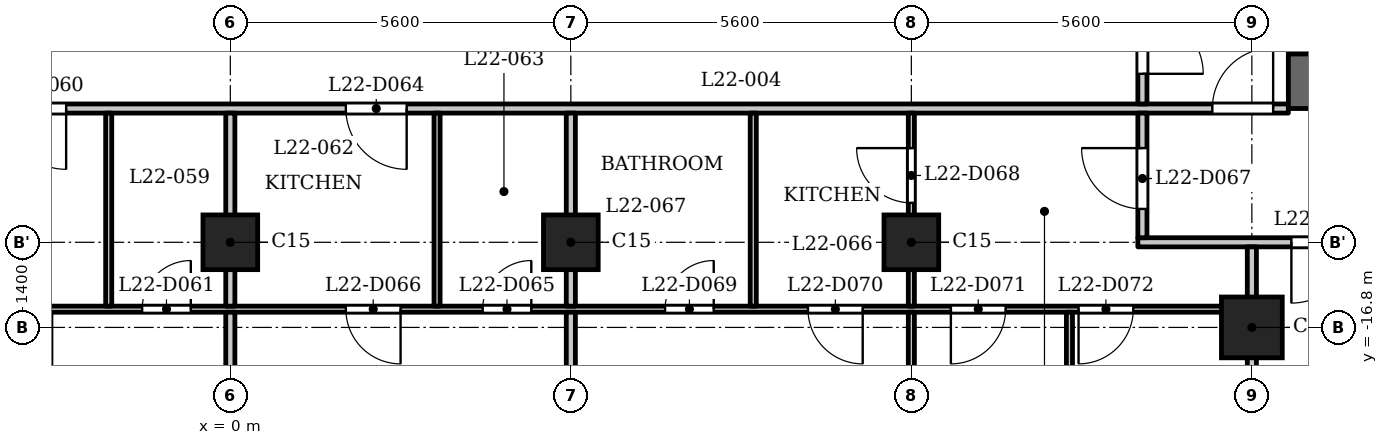
"""IFC4 building model, lengths in metres.
Left out: names, types, materials, properties, quantities, classifications, styles, units other than length and angle.
Written with IfcOpenShell. Run it as: python <this file> out.ifc"""

import sys

from ifc_helpers import new_model, si_unit, direction, frame, frame_2d, origin, origin_2d, place, context, subcontext, project, spatial, rectangle, extrude, element, fill, save


model = new_model("IFC4")
c1 = context("Model", 3, precision=1e-05, world=origin(), true_north=direction((0.0, 1.0)))
c2 = subcontext(c1, "Body", "Model", "MODEL_VIEW")
j1 = project(units=[si_unit("LENGTHUNIT", "METRE"), si_unit("PLANEANGLEUNIT", "RADIAN")], contexts=[c1])
p1 = place(None, origin())
s1 = spatial("IfcSite", under=j1, at=p1, CompositionType="ELEMENT")
p2 = place(p1, origin())
s2 = spatial("IfcBuilding", under=s1, at=p2, CompositionType="ELEMENT")
p3 = place(p2, frame((0.0, 0.0, 90.3)))
s3 = spatial("IfcBuildingStorey", under=s2, at=p3, CompositionType="ELEMENT", Elevation=90.3)
p4 = place(p3, frame((16.8, -16.8, 0.0), z_axis=(0.0, 0.0, 1.0), x_axis=(1.0, 0.0, 0.0)))
e1 = element("IfcColumn", 1, at=p4, inside=s3, PredefinedType="COLUMN", context=c2, shape_type="SweptSolid", body=[
    extrude(rectangle(XDim=1.0, YDim=1.0, at=origin_2d()), origin(), (0.0, 0.0, 1.0), 3.5),
])
for number, where, z_axis, x_axis in (
    (2, (0.0, -15.4, 0.0), (0.0, 0.0, 1.0), (1.0, 0.0, 0.0)),
    (3, (5.6, -15.4, 0.0), (0.0, 0.0, 1.0), (1.0, 0.0, 0.0)),
    (4, (11.2, -15.4, 0.0), (0.0, 0.0, 1.0), (1.0, 0.0, 0.0)),
):
    element("IfcColumn", number, at=place(p3, frame(where, z_axis=z_axis, x_axis=x_axis)), inside=s3, PredefinedType="COLUMN", context=c2, shape_type="SweptSolid", body=[
        extrude(rectangle(XDim=0.9, YDim=0.9, at=origin_2d()), origin(), (0.0, 0.0, 1.0), 3.5),
    ])
p5 = place(p3, frame((17.4, -12.75, 0.0), z_axis=(0.0, 0.0, 1.0), x_axis=(1.0, 0.0, 0.0)))
e5 = element("IfcWall", 5, at=p5, inside=s3, PredefinedType="SHEAR", context=c2, shape_type="SweptSolid", body=[
    extrude(rectangle(XDim=10.4, YDim=0.9, at=frame_2d((5.2, 0.0))), origin(), (0.0, 0.0, 1.0), 3.2),
])
p6 = place(p3, frame((17.6, -12.3, 0.0), z_axis=(0.0, 0.0, 1.0), x_axis=(0.0, 1.0, 0.0)))
e6 = element("IfcWall", 6, at=p6, inside=s3, PredefinedType="SHEAR", context=c2, shape_type="SweptSolid", body=[
    extrude(rectangle(XDim=24.6, YDim=0.4, at=frame_2d((12.3, 0.0))), origin(), (0.0, 0.0, 1.0), 3.2),
])
p7 = place(p6, frame((6.0, 0.0, 0.0)))
e7 = element("IfcOpeningElement", 7, at=p7, cuts=e6, PredefinedType="OPENING", context=c2, shape_type="SweptSolid", body=[
    extrude(rectangle(XDim=1.1, YDim=2.1, at=frame_2d((0.55, 1.05))), frame((0.0, 0.21, 0.0), z_axis=(0.0, -1.0, 0.0), x_axis=(1.0, 0.0, 0.0)), (0.0, 0.0, 1.0), 0.42),
])
p8 = place(p6, frame((8.4, 0.0, 0.0)))
e8 = element("IfcOpeningElement", 8, at=p8, cuts=e6, PredefinedType="OPENING", context=c2, shape_type="SweptSolid", body=[
    extrude(rectangle(XDim=1.1, YDim=2.1, at=frame_2d((0.55, 1.05))), frame((0.0, 0.21, 0.0), z_axis=(0.0, -1.0, 0.0), x_axis=(1.0, 0.0, 0.0)), (0.0, 0.0, 1.0), 0.42),
])
p9 = place(p6, frame((10.8, 0.0, 0.0)))
e9 = element("IfcOpeningElement", 9, at=p9, cuts=e6, PredefinedType="OPENING", context=c2, shape_type="SweptSolid", body=[
    extrude(rectangle(XDim=1.1, YDim=2.1, at=frame_2d((0.55, 1.05))), frame((0.0, 0.21, 0.0), z_axis=(0.0, -1.0, 0.0), x_axis=(1.0, 0.0, 0.0)), (0.0, 0.0, 1.0), 0.42),
])
p10 = place(p6, frame((16.75, 0.0, 0.0)))
e10 = element("IfcOpeningElement", 10, at=p10, cuts=e6, PredefinedType="OPENING", context=c2, shape_type="SweptSolid", body=[
    extrude(rectangle(XDim=0.9, YDim=2.1, at=frame_2d((0.45, 1.05))), frame((0.0, 0.21, 0.0), z_axis=(0.0, -1.0, 0.0), x_axis=(1.0, 0.0, 0.0)), (0.0, 0.0, 1.0), 0.42),
])
p11 = place(p6, frame((22.8, 0.0, 0.0)))
e11 = element("IfcOpeningElement", 11, at=p11, cuts=e6, PredefinedType="OPENING", context=c2, shape_type="SweptSolid", body=[
    extrude(rectangle(XDim=1.1, YDim=2.1, at=frame_2d((0.55, 1.05))), frame((0.0, 0.21, 0.0), z_axis=(0.0, -1.0, 0.0), x_axis=(1.0, 0.0, 0.0)), (0.0, 0.0, 1.0), 0.42),
])
p12 = place(p6, frame((0.7, 0.0, 0.0)))
e12 = element("IfcOpeningElement", 12, at=p12, cuts=e6, PredefinedType="OPENING", context=c2, shape_type="SweptSolid", body=[
    extrude(rectangle(XDim=1.1, YDim=2.1, at=frame_2d((0.55, 1.05))), frame((0.0, 0.21, 0.0), z_axis=(0.0, -1.0, 0.0), x_axis=(1.0, 0.0, 0.0)), (0.0, 0.0, 1.0), 0.42),
])
p13 = place(p6, frame((12.775, 0.0, 0.0)))
e13 = element("IfcOpeningElement", 13, at=p13, cuts=e6, PredefinedType="OPENING", context=c2, shape_type="SweptSolid", body=[
    extrude(rectangle(XDim=1.8, YDim=2.1, at=frame_2d((0.9, 1.05))), frame((0.0, 0.21, 0.0), z_axis=(0.0, -1.0, 0.0), x_axis=(1.0, 0.0, 0.0)), (0.0, 0.0, 1.0), 0.42),
])
p14 = place(p3, frame((-16.725, -16.5, 0.0), z_axis=(0.0, 0.0, 1.0), x_axis=(1.0, 0.0, 0.0)))
e14 = element("IfcWall", 14, at=p14, inside=s3, PredefinedType="PARTITIONING", context=c2, shape_type="SweptSolid", body=[
    extrude(rectangle(XDim=33.45, YDim=0.1, at=frame_2d((16.725, 0.0))), origin(), (0.0, 0.0, 1.0), 3.2),
])
p15 = place(p14, frame((3.825, 0.0, 0.0)))
e15 = element("IfcOpeningElement", 15, at=p15, cuts=e14, PredefinedType="OPENING", context=c2, shape_type="SweptSolid", body=[
    extrude(rectangle(XDim=0.8, YDim=2.1, at=frame_2d((0.4, 1.05))), frame((0.0, 0.06, 0.0), z_axis=(0.0, -1.0, 0.0), x_axis=(1.0, 0.0, 0.0)), (0.0, 0.0, 1.0), 0.12),
])
p16 = place(p14, frame((1.825, 0.0, 0.0)))
e16 = element("IfcOpeningElement", 16, at=p16, cuts=e14, PredefinedType="OPENING", context=c2, shape_type="SweptSolid", body=[
    extrude(rectangle(XDim=0.9, YDim=2.1, at=frame_2d((0.45, 1.05))), frame((0.0, 0.06, 0.0), z_axis=(0.0, -1.0, 0.0), x_axis=(1.0, 0.0, 0.0)), (0.0, 0.0, 1.0), 0.12),
])
p17 = place(p14, frame((9.675, 0.0, 0.0)))
e17 = element("IfcOpeningElement", 17, at=p17, cuts=e14, PredefinedType="OPENING", context=c2, shape_type="SweptSolid", body=[
    extrude(rectangle(XDim=0.8, YDim=2.1, at=frame_2d((0.4, 1.05))), frame((0.0, 0.06, 0.0), z_axis=(0.0, -1.0, 0.0), x_axis=(1.0, 0.0, 0.0)), (0.0, 0.0, 1.0), 0.12),
])
p18 = place(p14, frame((6.425, 0.0, 0.0)))
e18 = element("IfcOpeningElement", 18, at=p18, cuts=e14, PredefinedType="OPENING", context=c2, shape_type="SweptSolid", body=[
    extrude(rectangle(XDim=0.9, YDim=2.1, at=frame_2d((0.45, 1.05))), frame((0.0, 0.06, 0.0), z_axis=(0.0, -1.0, 0.0), x_axis=(1.0, 0.0, 0.0)), (0.0, 0.0, 1.0), 0.12),
])
p19 = place(p14, frame((15.275, 0.0, 0.0)))
e19 = element("IfcOpeningElement", 19, at=p19, cuts=e14, PredefinedType="OPENING", context=c2, shape_type="SweptSolid", body=[
    extrude(rectangle(XDim=0.8, YDim=2.1, at=frame_2d((0.4, 1.05))), frame((0.0, 0.06, 0.0), z_axis=(0.0, -1.0, 0.0), x_axis=(1.0, 0.0, 0.0)), (0.0, 0.0, 1.0), 0.12),
])
p20 = place(p14, frame((12.025, 0.0, 0.0)))
e20 = element("IfcOpeningElement", 20, at=p20, cuts=e14, PredefinedType="OPENING", context=c2, shape_type="SweptSolid", body=[
    extrude(rectangle(XDim=0.9, YDim=2.1, at=frame_2d((0.45, 1.05))), frame((0.0, 0.06, 0.0), z_axis=(0.0, -1.0, 0.0), x_axis=(1.0, 0.0, 0.0)), (0.0, 0.0, 1.0), 0.12),
])
p21 = place(p14, frame((20.875, 0.0, 0.0)))
e21 = element("IfcOpeningElement", 21, at=p21, cuts=e14, PredefinedType="OPENING", context=c2, shape_type="SweptSolid", body=[
    extrude(rectangle(XDim=0.8, YDim=2.1, at=frame_2d((0.4, 1.05))), frame((0.0, 0.06, 0.0), z_axis=(0.0, -1.0, 0.0), x_axis=(1.0, 0.0, 0.0)), (0.0, 0.0, 1.0), 0.12),
])
p22 = place(p14, frame((18.625, 0.0, 0.0)))
e22 = element("IfcOpeningElement", 22, at=p22, cuts=e14, PredefinedType="OPENING", context=c2, shape_type="SweptSolid", body=[
    extrude(rectangle(XDim=0.9, YDim=2.1, at=frame_2d((0.45, 1.05))), frame((0.0, 0.06, 0.0), z_axis=(0.0, -1.0, 0.0), x_axis=(1.0, 0.0, 0.0)), (0.0, 0.0, 1.0), 0.12),
])
p23 = place(p14, frame((23.875, 0.0, 0.0)))
e23 = element("IfcOpeningElement", 23, at=p23, cuts=e14, PredefinedType="OPENING", context=c2, shape_type="SweptSolid", body=[
    extrude(rectangle(XDim=0.8, YDim=2.1, at=frame_2d((0.4, 1.05))), frame((0.0, 0.06, 0.0), z_axis=(0.0, -1.0, 0.0), x_axis=(1.0, 0.0, 0.0)), (0.0, 0.0, 1.0), 0.12),
])
p24 = place(p14, frame((26.225, 0.0, 0.0)))
e24 = element("IfcOpeningElement", 24, at=p24, cuts=e14, PredefinedType="OPENING", context=c2, shape_type="SweptSolid", body=[
    extrude(rectangle(XDim=0.9, YDim=2.1, at=frame_2d((0.45, 1.05))), frame((0.0, 0.06, 0.0), z_axis=(0.0, -1.0, 0.0), x_axis=(1.0, 0.0, 0.0)), (0.0, 0.0, 1.0), 0.12),
])
p25 = place(p14, frame((28.575, 0.0, 0.0)))
e25 = element("IfcOpeningElement", 25, at=p25, cuts=e14, PredefinedType="OPENING", context=c2, shape_type="SweptSolid", body=[
    extrude(rectangle(XDim=0.9, YDim=2.1, at=frame_2d((0.45, 1.05))), frame((0.0, 0.06, 0.0), z_axis=(0.0, -1.0, 0.0), x_axis=(1.0, 0.0, 0.0)), (0.0, 0.0, 1.0), 0.12),
])
p26 = place(p14, frame((30.675, 0.0, 0.0)))
e26 = element("IfcOpeningElement", 26, at=p26, cuts=e14, PredefinedType="OPENING", context=c2, shape_type="SweptSolid", body=[
    extrude(rectangle(XDim=0.9, YDim=2.1, at=frame_2d((0.45, 1.05))), frame((0.0, 0.06, 0.0), z_axis=(0.0, -1.0, 0.0), x_axis=(1.0, 0.0, 0.0)), (0.0, 0.0, 1.0), 0.12),
])
p27 = place(p3, frame((14.925, -15.4, 0.0), z_axis=(0.0, 0.0, 1.0), x_axis=(1.0, 0.0, 0.0)))
e27 = element("IfcWall", 27, at=p27, inside=s3, PredefinedType="PARTITIONING", context=c2, shape_type="SweptSolid", body=[
    extrude(rectangle(XDim=12.559, YDim=0.15, at=frame_2d((6.279, 0.0))), origin(), (0.0, 0.0, 1.0), 3.2),
])
p28 = place(p27, frame((2.525, 0.0, 0.0)))
e28 = element("IfcOpeningElement", 28, at=p28, cuts=e27, PredefinedType="OPENING", context=c2, shape_type="SweptSolid", body=[
    extrude(rectangle(XDim=1.0, YDim=2.1, at=frame_2d((0.5, 1.05))), frame((0.0, 0.085, 0.0), z_axis=(0.0, -1.0, 0.0), x_axis=(1.0, 0.0, 0.0)), (0.0, 0.0, 1.0), 0.17),
])
p29 = place(p3, frame((-17.4, -13.2, 0.0), z_axis=(0.0, 0.0, 1.0), x_axis=(1.0, 0.0, 0.0)))
e29 = element("IfcWall", 29, at=p29, inside=s3, PredefinedType="PARTITIONING", context=c2, shape_type="SweptSolid", body=[
    extrude(rectangle(XDim=34.8, YDim=0.15, at=frame_2d((17.4, 0.0))), origin(), (0.0, 0.0, 1.0), 3.2),
])
p30 = place(p29, frame((0.15, 0.0, 0.0)))
e30 = element("IfcOpeningElement", 30, at=p30, cuts=e29, PredefinedType="OPENING", context=c2, shape_type="SweptSolid", body=[
    extrude(rectangle(XDim=1.0, YDim=2.1, at=frame_2d((0.5, 1.05))), frame((0.0, 0.085, 0.0), z_axis=(0.0, -1.0, 0.0), x_axis=(1.0, 0.0, 0.0)), (0.0, 0.0, 1.0), 0.17),
])
p31 = place(p29, frame((33.55, 0.0, 0.0)))
e31 = element("IfcOpeningElement", 31, at=p31, cuts=e29, PredefinedType="OPENING", context=c2, shape_type="SweptSolid", body=[
    extrude(rectangle(XDim=1.0, YDim=2.1, at=frame_2d((0.5, 1.05))), frame((0.0, 0.085, 0.0), z_axis=(0.0, -1.0, 0.0), x_axis=(1.0, 0.0, 0.0)), (0.0, 0.0, 1.0), 0.17),
])
p32 = place(p29, frame((7.35, 0.0, 0.0)))
e32 = element("IfcOpeningElement", 32, at=p32, cuts=e29, PredefinedType="OPENING", context=c2, shape_type="SweptSolid", body=[
    extrude(rectangle(XDim=1.0, YDim=2.1, at=frame_2d((0.5, 1.05))), frame((0.0, 0.085, 0.0), z_axis=(0.0, -1.0, 0.0), x_axis=(1.0, 0.0, 0.0)), (0.0, 0.0, 1.0), 0.17),
])
p33 = place(p29, frame((13.7, 0.0, 0.0)))
e33 = element("IfcOpeningElement", 33, at=p33, cuts=e29, PredefinedType="OPENING", context=c2, shape_type="SweptSolid", body=[
    extrude(rectangle(XDim=1.0, YDim=2.1, at=frame_2d((0.5, 1.05))), frame((0.0, 0.085, 0.0), z_axis=(0.0, -1.0, 0.0), x_axis=(1.0, 0.0, 0.0)), (0.0, 0.0, 1.0), 0.17),
])
p34 = place(p29, frame((19.3, 0.0, 0.0)))
e34 = element("IfcOpeningElement", 34, at=p34, cuts=e29, PredefinedType="OPENING", context=c2, shape_type="SweptSolid", body=[
    extrude(rectangle(XDim=1.0, YDim=2.1, at=frame_2d((0.5, 1.05))), frame((0.0, 0.085, 0.0), z_axis=(0.0, -1.0, 0.0), x_axis=(1.0, 0.0, 0.0)), (0.0, 0.0, 1.0), 0.17),
])
p35 = place(p3, frame((-2.0, -16.45, 0.0), z_axis=(0.0, 0.0, 1.0), x_axis=(0.0, 1.0, 0.0)))
e35 = element("IfcWall", 35, at=p35, inside=s3, PredefinedType="PARTITIONING", context=c2, shape_type="SweptSolid", body=[
    extrude(rectangle(XDim=3.175, YDim=0.1, at=frame_2d((1.587, 0.0))), origin(), (0.0, 0.0, 1.0), 3.2),
])
p36 = place(p3, frame((0.0, -23.03, 0.0), z_axis=(0.0, 0.0, 1.0), x_axis=(0.0, 1.0, 0.0)))
e36 = element("IfcWall", 36, at=p36, inside=s3, PredefinedType="PARTITIONING", context=c2, shape_type="SweptSolid", body=[
    extrude(rectangle(XDim=6.48, YDim=0.15, at=frame_2d((3.24, 0.0))), origin(), (0.0, 0.0, 1.0), 3.2),
])
p37 = place(p3, frame((0.0, -16.45, 0.0), z_axis=(0.0, 0.0, 1.0), x_axis=(0.0, 1.0, 0.0)))
e37 = element("IfcWall", 37, at=p37, inside=s3, PredefinedType="PARTITIONING", context=c2, shape_type="SweptSolid", body=[
    extrude(rectangle(XDim=3.175, YDim=0.15, at=frame_2d((1.587, 0.0))), origin(), (0.0, 0.0, 1.0), 3.2),
])
p38 = place(p3, frame((3.4, -16.45, 0.0), z_axis=(0.0, 0.0, 1.0), x_axis=(0.0, 1.0, 0.0)))
e38 = element("IfcWall", 38, at=p38, inside=s3, PredefinedType="PARTITIONING", context=c2, shape_type="SweptSolid", body=[
    extrude(rectangle(XDim=3.175, YDim=0.1, at=frame_2d((1.587, 0.0))), origin(), (0.0, 0.0, 1.0), 3.2),
])
p39 = place(p3, frame((5.6, -23.03, 0.0), z_axis=(0.0, 0.0, 1.0), x_axis=(0.0, 1.0, 0.0)))
e39 = element("IfcWall", 39, at=p39, inside=s3, PredefinedType="PARTITIONING", context=c2, shape_type="SweptSolid", body=[
    extrude(rectangle(XDim=6.48, YDim=0.15, at=frame_2d((3.24, 0.0))), origin(), (0.0, 0.0, 1.0), 3.2),
])
p40 = place(p3, frame((5.6, -16.45, 0.0), z_axis=(0.0, 0.0, 1.0), x_axis=(0.0, 1.0, 0.0)))
e40 = element("IfcWall", 40, at=p40, inside=s3, PredefinedType="PARTITIONING", context=c2, shape_type="SweptSolid", body=[
    extrude(rectangle(XDim=3.175, YDim=0.15, at=frame_2d((1.587, 0.0))), origin(), (0.0, 0.0, 1.0), 3.2),
])
p41 = place(p3, frame((8.6, -16.45, 0.0), z_axis=(0.0, 0.0, 1.0), x_axis=(0.0, 1.0, 0.0)))
e41 = element("IfcWall", 41, at=p41, inside=s3, PredefinedType="PARTITIONING", context=c2, shape_type="SweptSolid", body=[
    extrude(rectangle(XDim=3.175, YDim=0.1, at=frame_2d((1.587, 0.0))), origin(), (0.0, 0.0, 1.0), 3.2),
])
p42 = place(p3, frame((11.2, -23.03, 0.0), z_axis=(0.0, 0.0, 1.0), x_axis=(0.0, 1.0, 0.0)))
e42 = element("IfcWall", 42, at=p42, inside=s3, PredefinedType="PARTITIONING", context=c2, shape_type="SweptSolid", body=[
    extrude(rectangle(XDim=6.48, YDim=0.1, at=frame_2d((3.24, 0.0))), origin(), (0.0, 0.0, 1.0), 3.2),
])
p43 = place(p3, frame((11.2, -16.45, 0.0), z_axis=(0.0, 0.0, 1.0), x_axis=(0.0, 1.0, 0.0)))
e43 = element("IfcWall", 43, at=p43, inside=s3, PredefinedType="PARTITIONING", context=c2, shape_type="SweptSolid", body=[
    extrude(rectangle(XDim=3.175, YDim=0.1, at=frame_2d((1.587, 0.0))), origin(), (0.0, 0.0, 1.0), 3.2),
])
p44 = place(p43, frame((1.699, 0.0, 0.0)))
e44 = element("IfcOpeningElement", 44, at=p44, cuts=e43, PredefinedType="OPENING", context=c2, shape_type="SweptSolid", body=[
    extrude(rectangle(XDim=0.9, YDim=2.1, at=frame_2d((0.45, 1.05))), frame((0.0, 0.06, 0.0), z_axis=(0.0, -1.0, 0.0), x_axis=(1.0, 0.0, 0.0)), (0.0, 0.0, 1.0), 0.12),
])
p45 = place(p3, frame((13.8, -22.08, 0.0), z_axis=(0.0, 0.0, 1.0), x_axis=(0.0, 1.0, 0.0)))
e45 = element("IfcWall", 45, at=p45, inside=s3, PredefinedType="PARTITIONING", context=c2, shape_type="SweptSolid", body=[
    extrude(rectangle(XDim=5.53, YDim=0.1, at=frame_2d((2.765, 0.0))), origin(), (0.0, 0.0, 1.0), 3.2),
])
p46 = place(p3, frame((15.0, -15.325, 0.0), z_axis=(0.0, 0.0, 1.0), x_axis=(0.0, 1.0, 0.0)))
e46 = element("IfcWall", 46, at=p46, inside=s3, PredefinedType="PARTITIONING", context=c2, shape_type="SweptSolid", body=[
    extrude(rectangle(XDim=2.05, YDim=0.15, at=frame_2d((1.025, 0.0))), origin(), (0.0, 0.0, 1.0), 3.2),
])
p47 = place(p46, frame((0.474, 0.0, 0.0)))
e47 = element("IfcOpeningElement", 47, at=p47, cuts=e46, PredefinedType="OPENING", context=c2, shape_type="SweptSolid", body=[
    extrude(rectangle(XDim=1.0, YDim=2.1, at=frame_2d((0.5, 1.05))), frame((0.0, 0.085, 0.0), z_axis=(0.0, -1.0, 0.0), x_axis=(1.0, 0.0, 0.0)), (0.0, 0.0, 1.0), 0.17),
])
p48 = place(p3, frame((15.0, -13.125, 0.0), z_axis=(0.0, 0.0, 1.0), x_axis=(0.0, 1.0, 0.0)))
e48 = element("IfcWall", 48, at=p48, inside=s3, PredefinedType="PARTITIONING", context=c2, shape_type="SweptSolid", body=[
    extrude(rectangle(XDim=6.356, YDim=0.15, at=frame_2d((3.178, 0.0))), origin(), (0.0, 0.0, 1.0), 3.2),
])
p49 = place(p48, frame((0.496, 0.0, 0.0)))
e49 = element("IfcOpeningElement", 49, at=p49, cuts=e48, PredefinedType="OPENING", context=c2, shape_type="SweptSolid", body=[
    extrude(rectangle(XDim=1.0, YDim=2.1, at=frame_2d((0.5, 1.05))), frame((0.0, 0.085, 0.0), z_axis=(0.0, -1.0, 0.0), x_axis=(1.0, 0.0, 0.0)), (0.0, 0.0, 1.0), 0.17),
])
p50 = place(p3, frame((16.8, -23.03, 0.0), z_axis=(0.0, 0.0, 1.0), x_axis=(0.0, 1.0, 0.0)))
e50 = element("IfcWall", 50, at=p50, inside=s3, PredefinedType="PARTITIONING", context=c2, shape_type="SweptSolid", body=[
    extrude(rectangle(XDim=7.555, YDim=0.15, at=frame_2d((3.777, 0.0))), origin(), (0.0, 0.0, 1.0), 3.2),
])
p51 = place(p49, origin())
e51 = element("IfcDoor", 51, at=p51, inside=s3, OperationType="SINGLE_SWING_LEFT", PredefinedType="DOOR", context=c2, shape_type="SweptSolid", body=[
    extrude(rectangle(XDim=1.0, YDim=2.1, at=frame_2d((0.5, 1.05))), frame((0.0, 0.025, 0.0), z_axis=(0.0, -1.0, 0.0), x_axis=(1.0, 0.0, 0.0)), (0.0, 0.0, 1.0), 0.05),
])
fill(e49, e51)
p52 = place(p31, origin())
e52 = element("IfcDoor", 52, at=p52, inside=s3, OperationType="SINGLE_SWING_LEFT", PredefinedType="DOOR", context=c2, shape_type="SweptSolid", body=[
    extrude(rectangle(XDim=1.0, YDim=2.1, at=frame_2d((0.5, 1.05))), frame((0.0, 0.025, 0.0), z_axis=(0.0, -1.0, 0.0), x_axis=(1.0, 0.0, 0.0)), (0.0, 0.0, 1.0), 0.05),
])
fill(e31, e52)
p53 = place(p33, origin())
e53 = element("IfcDoor", 53, at=p53, inside=s3, OperationType="SINGLE_SWING_RIGHT", PredefinedType="DOOR", context=c2, shape_type="SweptSolid", body=[
    extrude(rectangle(XDim=1.0, YDim=2.1, at=frame_2d((0.5, 1.05))), frame((0.0, 0.025, 0.0), z_axis=(0.0, -1.0, 0.0), x_axis=(1.0, 0.0, 0.0)), (0.0, 0.0, 1.0), 0.05),
])
fill(e33, e53)
p54 = place(p19, origin())
e54 = element("IfcDoor", 54, at=p54, inside=s3, OperationType="SINGLE_SWING_LEFT", PredefinedType="DOOR", context=c2, shape_type="SweptSolid", body=[
    extrude(rectangle(XDim=0.8, YDim=2.1, at=frame_2d((0.4, 1.05))), frame((0.0, 0.025, 0.0), z_axis=(0.0, -1.0, 0.0), x_axis=(1.0, 0.0, 0.0)), (0.0, 0.0, 1.0), 0.05),
])
fill(e19, e54)
p55 = place(p34, origin())
e55 = element("IfcDoor", 55, at=p55, inside=s3, OperationType="SINGLE_SWING_RIGHT", PredefinedType="DOOR", context=c2, shape_type="SweptSolid", body=[
    extrude(rectangle(XDim=1.0, YDim=2.1, at=frame_2d((0.5, 1.05))), frame((0.0, 0.025, 0.0), z_axis=(0.0, -1.0, 0.0), x_axis=(1.0, 0.0, 0.0)), (0.0, 0.0, 1.0), 0.05),
])
fill(e34, e55)
p56 = place(p21, origin())
e56 = element("IfcDoor", 56, at=p56, inside=s3, OperationType="SINGLE_SWING_LEFT", PredefinedType="DOOR", context=c2, shape_type="SweptSolid", body=[
    extrude(rectangle(XDim=0.8, YDim=2.1, at=frame_2d((0.4, 1.05))), frame((0.0, 0.025, 0.0), z_axis=(0.0, -1.0, 0.0), x_axis=(1.0, 0.0, 0.0)), (0.0, 0.0, 1.0), 0.05),
])
fill(e21, e56)
p57 = place(p22, origin())
e57 = element("IfcDoor", 57, at=p57, inside=s3, OperationType="SINGLE_SWING_RIGHT", PredefinedType="DOOR", context=c2, shape_type="SweptSolid", body=[
    extrude(rectangle(XDim=0.9, YDim=2.1, at=frame_2d((0.45, 1.05))), frame((0.0, 0.025, 0.0), z_axis=(0.0, -1.0, 0.0), x_axis=(1.0, 0.0, 0.0)), (0.0, 0.0, 1.0), 0.05),
])
fill(e22, e57)
p58 = place(p47, origin())
e58 = element("IfcDoor", 58, at=p58, inside=s3, OperationType="SINGLE_SWING_LEFT", PredefinedType="DOOR", context=c2, shape_type="SweptSolid", body=[
    extrude(rectangle(XDim=1.0, YDim=2.1, at=frame_2d((0.5, 1.05))), frame((0.0, 0.025, 0.0), z_axis=(0.0, -1.0, 0.0), x_axis=(1.0, 0.0, 0.0)), (0.0, 0.0, 1.0), 0.05),
])
fill(e47, e58)
p59 = place(p44, origin())
e59 = element("IfcDoor", 59, at=p59, inside=s3, OperationType="SINGLE_SWING_LEFT", PredefinedType="DOOR", context=c2, shape_type="SweptSolid", body=[
    extrude(rectangle(XDim=0.9, YDim=2.1, at=frame_2d((0.45, 1.05))), frame((0.0, 0.025, 0.0), z_axis=(0.0, -1.0, 0.0), x_axis=(1.0, 0.0, 0.0)), (0.0, 0.0, 1.0), 0.05),
])
fill(e44, e59)
p60 = place(p23, origin())
e60 = element("IfcDoor", 60, at=p60, inside=s3, OperationType="SINGLE_SWING_LEFT", PredefinedType="DOOR", context=c2, shape_type="SweptSolid", body=[
    extrude(rectangle(XDim=0.8, YDim=2.1, at=frame_2d((0.4, 1.05))), frame((0.0, 0.025, 0.0), z_axis=(0.0, -1.0, 0.0), x_axis=(1.0, 0.0, 0.0)), (0.0, 0.0, 1.0), 0.05),
])
fill(e23, e60)
p61 = place(p24, origin())
e61 = element("IfcDoor", 61, at=p61, inside=s3, OperationType="SINGLE_SWING_RIGHT", PredefinedType="DOOR", context=c2, shape_type="SweptSolid", body=[
    extrude(rectangle(XDim=0.9, YDim=2.1, at=frame_2d((0.45, 1.05))), frame((0.0, 0.025, 0.0), z_axis=(0.0, -1.0, 0.0), x_axis=(1.0, 0.0, 0.0)), (0.0, 0.0, 1.0), 0.05),
])
fill(e24, e61)
p62 = place(p25, origin())
e62 = element("IfcDoor", 62, at=p62, inside=s3, OperationType="SINGLE_SWING_LEFT", PredefinedType="DOOR", context=c2, shape_type="SweptSolid", body=[
    extrude(rectangle(XDim=0.9, YDim=2.1, at=frame_2d((0.45, 1.05))), frame((0.0, 0.025, 0.0), z_axis=(0.0, -1.0, 0.0), x_axis=(1.0, 0.0, 0.0)), (0.0, 0.0, 1.0), 0.05),
])
fill(e25, e62)
p63 = place(p26, origin())
e63 = element("IfcDoor", 63, at=p63, inside=s3, OperationType="SINGLE_SWING_LEFT", PredefinedType="DOOR", context=c2, shape_type="SweptSolid", body=[
    extrude(rectangle(XDim=0.9, YDim=2.1, at=frame_2d((0.45, 1.05))), frame((0.0, 0.025, 0.0), z_axis=(0.0, -1.0, 0.0), x_axis=(1.0, 0.0, 0.0)), (0.0, 0.0, 1.0), 0.05),
])
fill(e26, e63)
p64 = place(p28, origin())
e64 = element("IfcDoor", 64, at=p64, inside=s3, OperationType="SINGLE_SWING_LEFT", PredefinedType="DOOR", context=c2, shape_type="SweptSolid", body=[
    extrude(rectangle(XDim=1.0, YDim=2.1, at=frame_2d((0.5, 1.05))), frame((0.0, 0.025, 0.0), z_axis=(0.0, -1.0, 0.0), x_axis=(1.0, 0.0, 0.0)), (0.0, 0.0, 1.0), 0.05),
])
fill(e28, e64)
save(model, sys.argv[1])
